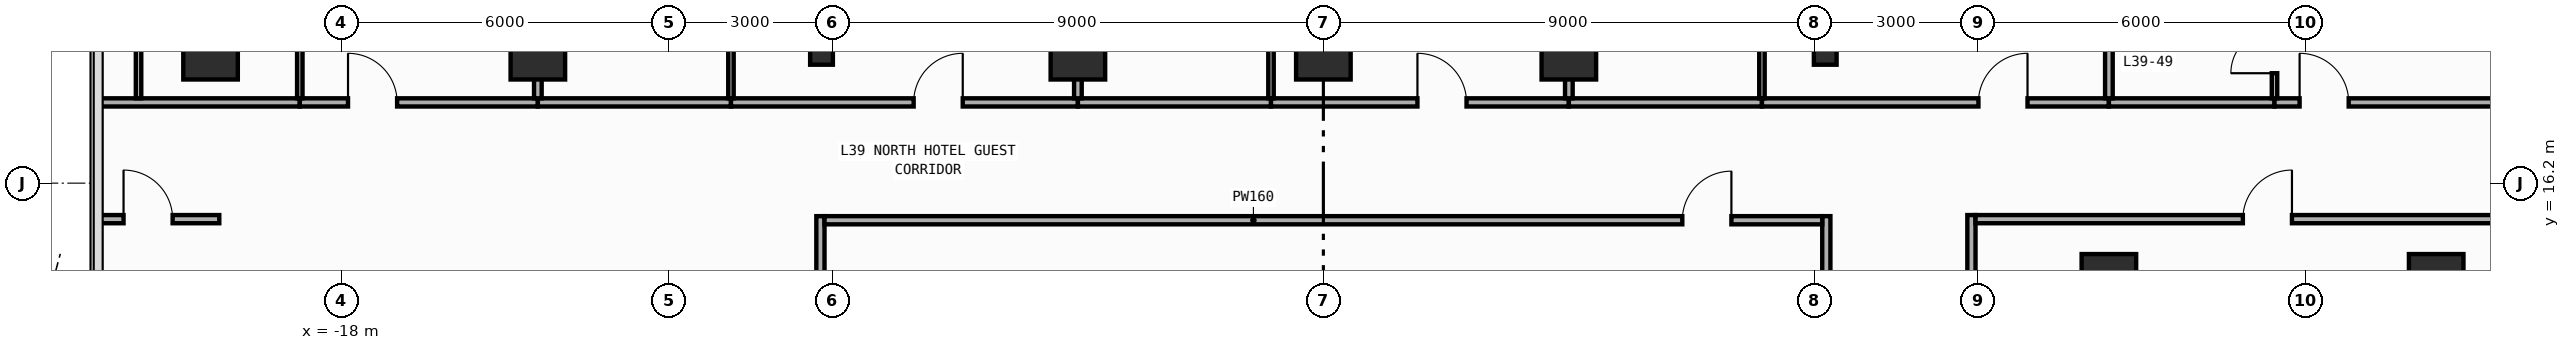
"""IFC4 building model, lengths in metres.
Left out: names, types, materials, properties, quantities, classifications, styles, units other than length and angle.
Written with IfcOpenShell. Run it as: python <this file> out.ifc"""

import sys

from ifc_helpers import new_model, si_unit, direction, frame, frame_2d, origin, origin_2d, place, context, subcontext, project, spatial, rectangle, i_section, extrude, element, fill, save


model = new_model("IFC4")
c1 = context("Model", 3, precision=1e-05, world=origin(), true_north=direction((0.0, 1.0)))
c2 = subcontext(c1, "Body", "Model", "MODEL_VIEW")
j1 = project(units=[si_unit("LENGTHUNIT", "METRE"), si_unit("PLANEANGLEUNIT", "RADIAN")], contexts=[c1])
p1 = place(None, origin())
s1 = spatial("IfcSite", under=j1, at=p1, CompositionType="ELEMENT")
p2 = place(p1, origin())
s2 = spatial("IfcBuilding", under=s1, at=p2, CompositionType="ELEMENT")
p3 = place(p2, frame((0.0, 0.0, 172.6)))
s3 = spatial("IfcBuildingStorey", under=s2, at=p3, CompositionType="ELEMENT", Elevation=172.6)
for number, where, z_axis, x_axis in (
    (1, (-9.2, 18.6, 0.0), (0.0, 0.0, 1.0), (1.0, 0.0, 0.0)),
    (2, (9.2, 18.6, 0.0), (0.0, 0.0, 1.0), (1.0, 0.0, 0.0)),
):
    element("IfcColumn", number, at=place(p3, frame(where, z_axis=z_axis, x_axis=x_axis)), inside=s3, PredefinedType="COLUMN", context=c2, shape_type="SweptSolid", body=[
        extrude(i_section(OverallWidth=0.417, OverallDepth=0.458, WebThickness=0.03, FlangeThickness=0.05, FilletRadius=0.022, at=origin_2d()), origin(), (0.0, 0.0, 1.0), 3.8),
    ])
for number, where, z_axis, x_axis in (
    (3, (-20.4, 18.6, 0.0), (0.0, 0.0, 1.0), (1.0, 0.0, 0.0)),
    (4, (20.4, 14.4, 0.0), (0.0, 0.0, 1.0), (1.0, 0.0, 0.0)),
    (5, (-14.4, 18.6, 0.0), (0.0, 0.0, 1.0), (1.0, 0.0, 0.0)),
    (6, (14.4, 14.4, 0.0), (0.0, 0.0, 1.0), (1.0, 0.0, 0.0)),
    (7, (-4.5, 18.6, 0.0), (0.0, 0.0, 1.0), (1.0, 0.0, 0.0)),
    (8, (0.0, 18.6, 0.0), (0.0, 0.0, 1.0), (1.0, 0.0, 0.0)),
    (9, (4.5, 18.6, 0.0), (0.0, 0.0, 1.0), (1.0, 0.0, 0.0)),
):
    element("IfcColumn", number, at=place(p3, frame(where, z_axis=z_axis, x_axis=x_axis)), inside=s3, PredefinedType="COLUMN", context=c2, shape_type="SweptSolid", body=[
        extrude(rectangle(XDim=1.0, YDim=1.0, at=origin_2d()), origin(), (0.0, 0.0, 1.0), 3.8),
    ])
p4 = place(p3, frame((-9.22, -3.6, 0.0), z_axis=(0.0, 0.0, 1.0), x_axis=(0.0, 1.0, 0.0)))
e10 = element("IfcWall", 10, at=p4, inside=s3, PredefinedType="PARTITIONING", context=c2, shape_type="SweptSolid", body=[
    extrude(rectangle(XDim=19.195, YDim=0.15, at=frame_2d((9.598, 0.0))), origin(), (0.0, 0.0, 1.0), 2.952),
])
p5 = place(p4, frame((8.542, 0.0, 0.0)))
e11 = element("IfcOpeningElement", 11, at=p5, cuts=e10, PredefinedType="OPENING", context=c2, shape_type="SweptSolid", body=[
    extrude(rectangle(XDim=0.9, YDim=2.15, at=frame_2d((0.45, 1.075))), frame((0.0, 0.085, 0.0), z_axis=(0.0, -1.0, 0.0), x_axis=(1.0, 0.0, 0.0)), (0.0, 0.0, 1.0), 0.17),
])
p6 = place(p3, frame((9.22, -3.6, 0.0), z_axis=(0.0, 0.0, 1.0), x_axis=(0.0, 1.0, 0.0)))
e12 = element("IfcWall", 12, at=p6, inside=s3, PredefinedType="PARTITIONING", context=c2, shape_type="SweptSolid", body=[
    extrude(rectangle(XDim=19.195, YDim=0.15, at=frame_2d((9.598, 0.0))), origin(), (0.0, 0.0, 1.0), 2.952),
])
p7 = place(p6, frame((8.542, 0.0, 0.0)))
e13 = element("IfcOpeningElement", 13, at=p7, cuts=e12, PredefinedType="OPENING", context=c2, shape_type="SweptSolid", body=[
    extrude(rectangle(XDim=0.9, YDim=2.15, at=frame_2d((0.45, 1.075))), frame((0.0, 0.085, 0.0), z_axis=(0.0, -1.0, 0.0), x_axis=(1.0, 0.0, 0.0)), (0.0, 0.0, 1.0), 0.17),
])
p8 = place(p3, frame((11.88, 7.16, 0.0), z_axis=(0.0, 0.0, 1.0), x_axis=(0.0, 1.0, 0.0)))
e14 = element("IfcWall", 14, at=p8, inside=s3, PredefinedType="PARTITIONING", context=c2, shape_type="SweptSolid", body=[
    extrude(rectangle(XDim=8.455, YDim=0.15, at=frame_2d((4.228, 0.0))), origin(), (0.0, 0.0, 1.0), 3.54),
])
p9 = place(p8, frame((0.46, 0.0, 0.0)))
e15 = element("IfcOpeningElement", 15, at=p9, cuts=e14, PredefinedType="OPENING", context=c2, shape_type="SweptSolid", body=[
    extrude(rectangle(XDim=0.9, YDim=2.15, at=frame_2d((0.45, 1.075))), frame((0.0, 0.085, 0.0), z_axis=(0.0, -1.0, 0.0), x_axis=(1.0, 0.0, 0.0)), (0.0, 0.0, 1.0), 0.17),
])
p10 = place(p3, frame((-9.145, 15.52, 0.0), z_axis=(0.0, 0.0, 1.0), x_axis=(1.0, 0.0, 0.0)))
e16 = element("IfcWall", 16, at=p10, inside=s3, PredefinedType="PARTITIONING", context=c2, shape_type="SweptSolid", body=[
    extrude(rectangle(XDim=18.29, YDim=0.15, at=frame_2d((9.145, 0.0))), origin(), (0.0, 0.0, 1.0), 3.54),
])
p11 = place(p10, frame((15.725, 0.0, 0.0)))
e17 = element("IfcOpeningElement", 17, at=p11, cuts=e16, PredefinedType="OPENING", context=c2, shape_type="SweptSolid", body=[
    extrude(rectangle(XDim=0.9, YDim=2.15, at=frame_2d((0.45, 1.075))), frame((0.0, 0.085, 0.0), z_axis=(0.0, -1.0, 0.0), x_axis=(1.0, 0.0, 0.0)), (0.0, 0.0, 1.0), 0.17),
])
p12 = place(p3, frame((-22.455, 17.68, 0.0), z_axis=(0.0, 0.0, 1.0), x_axis=(1.0, 0.0, 0.0)))
e18 = element("IfcWall", 18, at=p12, inside=s3, PredefinedType="PARTITIONING", context=c2, shape_type="SweptSolid", body=[
    extrude(rectangle(XDim=3.691, YDim=0.15, at=frame_2d((1.846, 0.0))), origin(), (0.0, 0.0, 1.0), 3.54),
])
p13 = place(p3, frame((-18.764, 17.68, 0.0), z_axis=(0.0, 0.0, 1.0), x_axis=(1.0, 0.0, 0.0)))
e19 = element("IfcWall", 19, at=p13, inside=s3, PredefinedType="PARTITIONING", context=c2, shape_type="SweptSolid", body=[
    extrude(rectangle(XDim=4.364, YDim=0.15, at=frame_2d((2.182, 0.0))), origin(), (0.0, 0.0, 1.0), 3.54),
])
p14 = place(p13, frame((0.884, 0.0, 0.0)))
e20 = element("IfcOpeningElement", 20, at=p14, cuts=e19, PredefinedType="OPENING", context=c2, shape_type="SweptSolid", body=[
    extrude(rectangle(XDim=0.9, YDim=2.15, at=frame_2d((0.45, 1.075))), frame((0.0, 0.085, 0.0), z_axis=(0.0, -1.0, 0.0), x_axis=(1.0, 0.0, 0.0)), (0.0, 0.0, 1.0), 0.17),
])
p15 = place(p3, frame((-14.4, 17.68, 0.0), z_axis=(0.0, 0.0, 1.0), x_axis=(1.0, 0.0, 0.0)))
e21 = element("IfcWall", 21, at=p15, inside=s3, PredefinedType="PARTITIONING", context=c2, shape_type="SweptSolid", body=[
    extrude(rectangle(XDim=3.54, YDim=0.15, at=frame_2d((1.77, 0.0))), origin(), (0.0, 0.0, 1.0), 3.54),
])
p16 = place(p3, frame((-10.86, 17.68, 0.0), z_axis=(0.0, 0.0, 1.0), x_axis=(1.0, 0.0, 0.0)))
e22 = element("IfcWall", 22, at=p16, inside=s3, PredefinedType="PARTITIONING", context=c2, shape_type="SweptSolid", body=[
    extrude(rectangle(XDim=6.36, YDim=0.15, at=frame_2d((3.18, 0.0))), origin(), (0.0, 0.0, 1.0), 3.54),
])
p17 = place(p16, frame((3.349, 0.0, 0.0)))
e23 = element("IfcOpeningElement", 23, at=p17, cuts=e22, PredefinedType="OPENING", context=c2, shape_type="SweptSolid", body=[
    extrude(rectangle(XDim=0.9, YDim=2.15, at=frame_2d((0.45, 1.075))), frame((0.0, 0.085, 0.0), z_axis=(0.0, -1.0, 0.0), x_axis=(1.0, 0.0, 0.0)), (0.0, 0.0, 1.0), 0.17),
])
p18 = place(p3, frame((-4.5, 17.68, 0.0), z_axis=(0.0, 0.0, 1.0), x_axis=(1.0, 0.0, 0.0)))
e24 = element("IfcWall", 24, at=p18, inside=s3, PredefinedType="PARTITIONING", context=c2, shape_type="SweptSolid", body=[
    extrude(rectangle(XDim=3.54, YDim=0.15, at=frame_2d((1.77, 0.0))), origin(), (0.0, 0.0, 1.0), 3.54),
])
p19 = place(p3, frame((-0.96, 17.68, 0.0), z_axis=(0.0, 0.0, 1.0), x_axis=(1.0, 0.0, 0.0)))
e25 = element("IfcWall", 25, at=p19, inside=s3, PredefinedType="PARTITIONING", context=c2, shape_type="SweptSolid", body=[
    extrude(rectangle(XDim=5.46, YDim=0.15, at=frame_2d((2.73, 0.0))), origin(), (0.0, 0.0, 1.0), 3.54),
])
p20 = place(p19, frame((2.684, 0.0, 0.0)))
e26 = element("IfcOpeningElement", 26, at=p20, cuts=e25, PredefinedType="OPENING", context=c2, shape_type="SweptSolid", body=[
    extrude(rectangle(XDim=0.9, YDim=2.15, at=frame_2d((0.45, 1.075))), frame((0.0, 0.085, 0.0), z_axis=(0.0, -1.0, 0.0), x_axis=(1.0, 0.0, 0.0)), (0.0, 0.0, 1.0), 0.17),
])
p21 = place(p3, frame((4.5, 17.68, 0.0), z_axis=(0.0, 0.0, 1.0), x_axis=(1.0, 0.0, 0.0)))
e27 = element("IfcWall", 27, at=p21, inside=s3, PredefinedType="PARTITIONING", context=c2, shape_type="SweptSolid", body=[
    extrude(rectangle(XDim=3.54, YDim=0.15, at=frame_2d((1.77, 0.0))), origin(), (0.0, 0.0, 1.0), 3.54),
])
p22 = place(p3, frame((8.04, 17.68, 0.0), z_axis=(0.0, 0.0, 1.0), x_axis=(1.0, 0.0, 0.0)))
e28 = element("IfcWall", 28, at=p22, inside=s3, PredefinedType="PARTITIONING", context=c2, shape_type="SweptSolid", body=[
    extrude(rectangle(XDim=6.36, YDim=0.15, at=frame_2d((3.18, 0.0))), origin(), (0.0, 0.0, 1.0), 3.54),
])
p23 = place(p22, frame((3.968, 0.0, 0.0)))
e29 = element("IfcOpeningElement", 29, at=p23, cuts=e28, PredefinedType="OPENING", context=c2, shape_type="SweptSolid", body=[
    extrude(rectangle(XDim=0.9, YDim=2.15, at=frame_2d((0.45, 1.075))), frame((0.0, 0.085, 0.0), z_axis=(0.0, -1.0, 0.0), x_axis=(1.0, 0.0, 0.0)), (0.0, 0.0, 1.0), 0.17),
])
p24 = place(p3, frame((14.4, 17.68, 0.0), z_axis=(0.0, 0.0, 1.0), x_axis=(1.0, 0.0, 0.0)))
e30 = element("IfcWall", 30, at=p24, inside=s3, PredefinedType="PARTITIONING", context=c2, shape_type="SweptSolid", body=[
    extrude(rectangle(XDim=3.036, YDim=0.15, at=frame_2d((1.518, 0.0))), origin(), (0.0, 0.0, 1.0), 3.54),
])
p25 = place(p3, frame((17.436, 17.68, 0.0), z_axis=(0.0, 0.0, 1.0), x_axis=(1.0, 0.0, 0.0)))
e31 = element("IfcWall", 31, at=p25, inside=s3, PredefinedType="PARTITIONING", context=c2, shape_type="SweptSolid", body=[
    extrude(rectangle(XDim=5.019, YDim=0.15, at=frame_2d((2.51, 0.0))), origin(), (0.0, 0.0, 1.0), 3.54),
])
p26 = place(p25, frame((0.46, 0.0, 0.0)))
e32 = element("IfcOpeningElement", 32, at=p26, cuts=e31, PredefinedType="OPENING", context=c2, shape_type="SweptSolid", body=[
    extrude(rectangle(XDim=0.9, YDim=2.15, at=frame_2d((0.45, 1.075))), frame((0.0, 0.085, 0.0), z_axis=(0.0, -1.0, 0.0), x_axis=(1.0, 0.0, 0.0)), (0.0, 0.0, 1.0), 0.17),
])
p27 = place(p3, frame((11.955, 15.54, 0.0), z_axis=(0.0, 0.0, 1.0), x_axis=(1.0, 0.0, 0.0)))
e33 = element("IfcWall", 33, at=p27, inside=s3, PredefinedType="PARTITIONING", context=c2, shape_type="SweptSolid", body=[
    extrude(rectangle(XDim=10.5, YDim=0.15, at=frame_2d((5.25, 0.0))), origin(), (0.0, 0.0, 1.0), 3.54),
])
p28 = place(p27, frame((4.901, 0.0, 0.0)))
e34 = element("IfcOpeningElement", 34, at=p28, cuts=e33, PredefinedType="OPENING", context=c2, shape_type="SweptSolid", body=[
    extrude(rectangle(XDim=0.9, YDim=2.15, at=frame_2d((0.45, 1.075))), frame((0.0, 0.085, 0.0), z_axis=(0.0, -1.0, 0.0), x_axis=(1.0, 0.0, 0.0)), (0.0, 0.0, 1.0), 0.17),
])
p29 = place(p3, frame((-22.455, 15.54, 0.0), z_axis=(0.0, 0.0, 1.0), x_axis=(1.0, 0.0, 0.0)))
e35 = element("IfcWall", 35, at=p29, inside=s3, PredefinedType="PARTITIONING", context=c2, shape_type="SweptSolid", body=[
    extrude(rectangle(XDim=2.215, YDim=0.15, at=frame_2d((1.107, 0.0))), origin(), (0.0, 0.0, 1.0), 3.54),
])
p30 = place(p29, frame((0.46, 0.0, 0.0)))
e36 = element("IfcOpeningElement", 36, at=p30, cuts=e35, PredefinedType="OPENING", context=c2, shape_type="SweptSolid", body=[
    extrude(rectangle(XDim=0.9, YDim=2.15, at=frame_2d((0.45, 1.075))), frame((0.0, 0.085, 0.0), z_axis=(0.0, -1.0, 0.0), x_axis=(1.0, 0.0, 0.0)), (0.0, 0.0, 1.0), 0.17),
])
p31 = place(p3, frame((-18.764, 17.755, 0.0), z_axis=(0.0, 0.0, 1.0), x_axis=(0.0, 1.0, 0.0)))
e37 = element("IfcWall", 37, at=p31, inside=s3, PredefinedType="PARTITIONING", context=c2, shape_type="SweptSolid", body=[
    extrude(rectangle(XDim=2.965, YDim=0.1, at=frame_2d((1.482, 0.0))), origin(), (0.0, 0.0, 1.0), 3.54),
])
p32 = place(p31, frame((1.705, 0.0, 0.0)))
e38 = element("IfcOpeningElement", 38, at=p32, cuts=e37, PredefinedType="OPENING", context=c2, shape_type="SweptSolid", body=[
    extrude(rectangle(XDim=0.8, YDim=2.1, at=frame_2d((0.4, 1.05))), frame((0.0, 0.06, 0.0), z_axis=(0.0, -1.0, 0.0), x_axis=(1.0, 0.0, 0.0)), (0.0, 0.0, 1.0), 0.12),
])
p33 = place(p3, frame((-14.4, 17.755, 0.0), z_axis=(0.0, 0.0, 1.0), x_axis=(0.0, 1.0, 0.0)))
e39 = element("IfcWall", 39, at=p33, inside=s3, PredefinedType="PARTITIONING", context=c2, shape_type="SweptSolid", body=[
    extrude(rectangle(XDim=3.015, YDim=0.14, at=frame_2d((1.508, 0.0))), origin(), (0.0, 0.0, 1.0), 2.952),
])
p34 = place(p3, frame((-10.86, 17.755, 0.0), z_axis=(0.0, 0.0, 1.0), x_axis=(0.0, 1.0, 0.0)))
e40 = element("IfcWall", 40, at=p34, inside=s3, PredefinedType="PARTITIONING", context=c2, shape_type="SweptSolid", body=[
    extrude(rectangle(XDim=2.965, YDim=0.1, at=frame_2d((1.482, 0.0))), origin(), (0.0, 0.0, 1.0), 3.54),
])
p35 = place(p34, frame((1.705, 0.0, 0.0)))
e41 = element("IfcOpeningElement", 41, at=p35, cuts=e40, PredefinedType="OPENING", context=c2, shape_type="SweptSolid", body=[
    extrude(rectangle(XDim=0.8, YDim=2.1, at=frame_2d((0.4, 1.05))), frame((0.0, 0.06, 0.0), z_axis=(0.0, -1.0, 0.0), x_axis=(1.0, 0.0, 0.0)), (0.0, 0.0, 1.0), 0.12),
])
p36 = place(p3, frame((-4.5, 17.755, 0.0), z_axis=(0.0, 0.0, 1.0), x_axis=(0.0, 1.0, 0.0)))
e42 = element("IfcWall", 42, at=p36, inside=s3, PredefinedType="PARTITIONING", context=c2, shape_type="SweptSolid", body=[
    extrude(rectangle(XDim=3.015, YDim=0.14, at=frame_2d((1.508, 0.0))), origin(), (0.0, 0.0, 1.0), 3.54),
])
p37 = place(p3, frame((-0.96, 17.755, 0.0), z_axis=(0.0, 0.0, 1.0), x_axis=(0.0, 1.0, 0.0)))
e43 = element("IfcWall", 43, at=p37, inside=s3, PredefinedType="PARTITIONING", context=c2, shape_type="SweptSolid", body=[
    extrude(rectangle(XDim=2.965, YDim=0.1, at=frame_2d((1.482, 0.0))), origin(), (0.0, 0.0, 1.0), 3.54),
])
p38 = place(p37, frame((1.705, 0.0, 0.0)))
e44 = element("IfcOpeningElement", 44, at=p38, cuts=e43, PredefinedType="OPENING", context=c2, shape_type="SweptSolid", body=[
    extrude(rectangle(XDim=0.8, YDim=2.1, at=frame_2d((0.4, 1.05))), frame((0.0, 0.06, 0.0), z_axis=(0.0, -1.0, 0.0), x_axis=(1.0, 0.0, 0.0)), (0.0, 0.0, 1.0), 0.12),
])
p39 = place(p3, frame((4.5, 17.755, 0.0), z_axis=(0.0, 0.0, 1.0), x_axis=(0.0, 1.0, 0.0)))
e45 = element("IfcWall", 45, at=p39, inside=s3, PredefinedType="PARTITIONING", context=c2, shape_type="SweptSolid", body=[
    extrude(rectangle(XDim=3.015, YDim=0.14, at=frame_2d((1.508, 0.0))), origin(), (0.0, 0.0, 1.0), 3.54),
])
p40 = place(p3, frame((8.04, 17.755, 0.0), z_axis=(0.0, 0.0, 1.0), x_axis=(0.0, 1.0, 0.0)))
e46 = element("IfcWall", 46, at=p40, inside=s3, PredefinedType="PARTITIONING", context=c2, shape_type="SweptSolid", body=[
    extrude(rectangle(XDim=2.965, YDim=0.1, at=frame_2d((1.482, 0.0))), origin(), (0.0, 0.0, 1.0), 3.54),
])
p41 = place(p40, frame((1.705, 0.0, 0.0)))
e47 = element("IfcOpeningElement", 47, at=p41, cuts=e46, PredefinedType="OPENING", context=c2, shape_type="SweptSolid", body=[
    extrude(rectangle(XDim=0.8, YDim=2.1, at=frame_2d((0.4, 1.05))), frame((0.0, 0.06, 0.0), z_axis=(0.0, -1.0, 0.0), x_axis=(1.0, 0.0, 0.0)), (0.0, 0.0, 1.0), 0.12),
])
p42 = place(p3, frame((14.4, 17.755, 0.0), z_axis=(0.0, 0.0, 1.0), x_axis=(0.0, 1.0, 0.0)))
e48 = element("IfcWall", 48, at=p42, inside=s3, PredefinedType="PARTITIONING", context=c2, shape_type="SweptSolid", body=[
    extrude(rectangle(XDim=3.015, YDim=0.14, at=frame_2d((1.508, 0.0))), origin(), (0.0, 0.0, 1.0), 2.952),
])
p43 = place(p3, frame((17.436, 17.755, 0.0), z_axis=(0.0, 0.0, 1.0), x_axis=(0.0, 1.0, 0.0)))
e49 = element("IfcWall", 49, at=p43, inside=s3, PredefinedType="PARTITIONING", context=c2, shape_type="SweptSolid", body=[
    extrude(rectangle(XDim=2.965, YDim=0.1, at=frame_2d((1.482, 0.0))), origin(), (0.0, 0.0, 1.0), 3.54),
])
p44 = place(p43, frame((0.46, 0.0, 0.0)))
e50 = element("IfcOpeningElement", 50, at=p44, cuts=e49, PredefinedType="OPENING", context=c2, shape_type="SweptSolid", body=[
    extrude(rectangle(XDim=0.8, YDim=2.1, at=frame_2d((0.4, 1.05))), frame((0.0, 0.06, 0.0), z_axis=(0.0, -1.0, 0.0), x_axis=(1.0, 0.0, 0.0)), (0.0, 0.0, 1.0), 0.12),
])
p45 = place(p3, frame((-21.72, 17.755, 0.0), z_axis=(0.0, 0.0, 1.0), x_axis=(0.0, 1.0, 0.0)))
e51 = element("IfcWall", 51, at=p45, inside=s3, PredefinedType="PARTITIONING", context=c2, shape_type="SweptSolid", body=[
    extrude(rectangle(XDim=2.965, YDim=0.1, at=frame_2d((1.482, 0.0))), origin(), (0.0, 0.0, 1.0), 3.54),
])
p46 = place(p11, origin())
e52 = element("IfcDoor", 52, at=p46, inside=s3, OperationType="SINGLE_SWING_RIGHT", PredefinedType="DOOR", context=c2, shape_type="SweptSolid", body=[
    extrude(rectangle(XDim=0.9, YDim=2.15, at=frame_2d((0.45, 1.075))), frame((0.0, 0.025, 0.0), z_axis=(0.0, -1.0, 0.0), x_axis=(1.0, 0.0, 0.0)), (0.0, 0.0, 1.0), 0.05),
])
fill(e17, e52)
p47 = place(p14, origin())
e53 = element("IfcDoor", 53, at=p47, inside=s3, OperationType="SINGLE_SWING_LEFT", PredefinedType="DOOR", context=c2, shape_type="SweptSolid", body=[
    extrude(rectangle(XDim=0.9, YDim=2.15, at=frame_2d((0.45, 1.075))), frame((0.0, 0.025, 0.0), z_axis=(0.0, -1.0, 0.0), x_axis=(1.0, 0.0, 0.0)), (0.0, 0.0, 1.0), 0.05),
])
fill(e20, e53)
p48 = place(p17, origin())
e54 = element("IfcDoor", 54, at=p48, inside=s3, OperationType="SINGLE_SWING_RIGHT", PredefinedType="DOOR", context=c2, shape_type="SweptSolid", body=[
    extrude(rectangle(XDim=0.9, YDim=2.15, at=frame_2d((0.45, 1.075))), frame((0.0, 0.025, 0.0), z_axis=(0.0, -1.0, 0.0), x_axis=(1.0, 0.0, 0.0)), (0.0, 0.0, 1.0), 0.05),
])
fill(e23, e54)
p49 = place(p20, origin())
e55 = element("IfcDoor", 55, at=p49, inside=s3, OperationType="SINGLE_SWING_LEFT", PredefinedType="DOOR", context=c2, shape_type="SweptSolid", body=[
    extrude(rectangle(XDim=0.9, YDim=2.15, at=frame_2d((0.45, 1.075))), frame((0.0, 0.025, 0.0), z_axis=(0.0, -1.0, 0.0), x_axis=(1.0, 0.0, 0.0)), (0.0, 0.0, 1.0), 0.05),
])
fill(e26, e55)
p50 = place(p23, origin())
e56 = element("IfcDoor", 56, at=p50, inside=s3, OperationType="SINGLE_SWING_RIGHT", PredefinedType="DOOR", context=c2, shape_type="SweptSolid", body=[
    extrude(rectangle(XDim=0.9, YDim=2.15, at=frame_2d((0.45, 1.075))), frame((0.0, 0.025, 0.0), z_axis=(0.0, -1.0, 0.0), x_axis=(1.0, 0.0, 0.0)), (0.0, 0.0, 1.0), 0.05),
])
fill(e29, e56)
p51 = place(p26, origin())
e57 = element("IfcDoor", 57, at=p51, inside=s3, OperationType="SINGLE_SWING_LEFT", PredefinedType="DOOR", context=c2, shape_type="SweptSolid", body=[
    extrude(rectangle(XDim=0.9, YDim=2.15, at=frame_2d((0.45, 1.075))), frame((0.0, 0.025, 0.0), z_axis=(0.0, -1.0, 0.0), x_axis=(1.0, 0.0, 0.0)), (0.0, 0.0, 1.0), 0.05),
])
fill(e32, e57)
p52 = place(p28, origin())
e58 = element("IfcDoor", 58, at=p52, inside=s3, OperationType="SINGLE_SWING_RIGHT", PredefinedType="DOOR", context=c2, shape_type="SweptSolid", body=[
    extrude(rectangle(XDim=0.9, YDim=2.15, at=frame_2d((0.45, 1.075))), frame((0.0, 0.025, 0.0), z_axis=(0.0, -1.0, 0.0), x_axis=(1.0, 0.0, 0.0)), (0.0, 0.0, 1.0), 0.05),
])
fill(e34, e58)
p53 = place(p30, origin())
e59 = element("IfcDoor", 59, at=p53, inside=s3, OperationType="SINGLE_SWING_LEFT", PredefinedType="DOOR", context=c2, shape_type="SweptSolid", body=[
    extrude(rectangle(XDim=0.9, YDim=2.15, at=frame_2d((0.45, 1.075))), frame((0.0, 0.025, 0.0), z_axis=(0.0, -1.0, 0.0), x_axis=(1.0, 0.0, 0.0)), (0.0, 0.0, 1.0), 0.05),
])
fill(e36, e59)
p54 = place(p44, origin())
e60 = element("IfcDoor", 60, at=p54, inside=s3, OperationType="SINGLE_SWING_LEFT", PredefinedType="DOOR", context=c2, shape_type="SweptSolid", body=[
    extrude(rectangle(XDim=0.8, YDim=2.1, at=frame_2d((0.4, 1.05))), frame((0.0, 0.025, 0.0), z_axis=(0.0, -1.0, 0.0), x_axis=(1.0, 0.0, 0.0)), (0.0, 0.0, 1.0), 0.05),
])
fill(e50, e60)
save(model, sys.argv[1])
